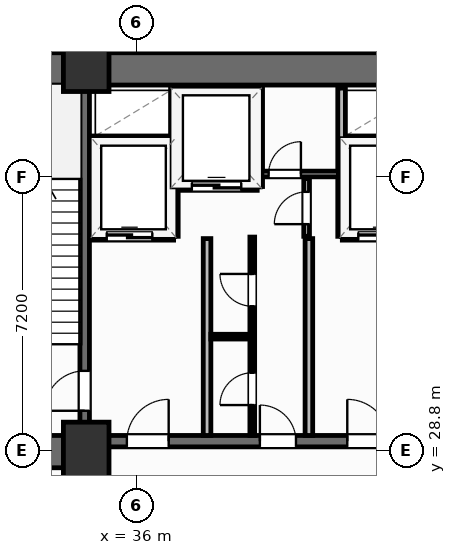
"""IFC4 building model, lengths in metres.
Left out: names, types, materials, properties, quantities, classifications, styles, units other than length and angle.
Written with IfcOpenShell. Run it as: python <this file> out.ifc"""

import sys

from ifc_helpers import new_model, si_unit, direction, frame, frame_2d, origin, origin_2d, place, context, subcontext, project, spatial, rectangle, extrude, element, fill, save


model = new_model("IFC4")
c1 = context("Model", 3, precision=1e-05, world=origin(), true_north=direction((0.0, 1.0)))
c2 = subcontext(c1, "Body", "Model", "MODEL_VIEW")
j1 = project(units=[si_unit("LENGTHUNIT", "METRE"), si_unit("PLANEANGLEUNIT", "RADIAN")], contexts=[c1])
p1 = place(None, origin())
s1 = spatial("IfcSite", under=j1, at=p1, CompositionType="ELEMENT")
p2 = place(p1, origin())
s2 = spatial("IfcBuilding", under=s1, at=p2, CompositionType="ELEMENT")
p3 = place(p2, frame((0.0, 0.0, 21.6)))
s3 = spatial("IfcBuildingStorey", under=s2, at=p3, CompositionType="ELEMENT", Elevation=21.6)
for number, where, z_axis, x_axis in (
    (1, (34.68, 28.75, 0.0), (0.0, 0.0, 1.0), (1.0, 0.0, 0.0)),
    (2, (34.68, 39.05, 0.0), (0.0, 0.0, 1.0), (1.0, 0.0, 0.0)),
):
    element("IfcColumn", number, at=place(p3, frame(where, z_axis=z_axis, x_axis=x_axis)), inside=s3, PredefinedType="COLUMN", context=c2, shape_type="SweptSolid", body=[
        extrude(rectangle(XDim=1.2, YDim=1.6, at=origin_2d()), origin(), (0.0, 0.0, 1.0), 5.4),
    ])
p4 = place(p3, frame((30.28, 38.845, 0.0), z_axis=(0.0, 0.0, 1.0), x_axis=(1.0, 0.0, 0.0)))
e3 = element("IfcWall", 3, at=p4, inside=s3, PredefinedType="SHEAR", context=c2, shape_type="SweptSolid", body=[
    extrude(rectangle(XDim=17.84, YDim=0.85, at=frame_2d((8.92, 0.0))), origin(), (0.0, 0.0, 1.0), 5.15),
])
p5 = place(p3, frame((30.28, 28.775, 0.0), z_axis=(0.0, 0.0, 1.0), x_axis=(1.0, 0.0, 0.0)))
e4 = element("IfcWall", 4, at=p5, inside=s3, PredefinedType="SHEAR", context=c2, shape_type="SweptSolid", body=[
    extrude(rectangle(XDim=4.52, YDim=0.85, at=frame_2d((2.26, 0.0))), origin(), (0.0, 0.0, 1.0), 5.15),
])
p6 = place(p3, frame((34.8, 29.05, 0.0), z_axis=(0.0, 0.0, 1.0), x_axis=(1.0, 0.0, 0.0)))
e5 = element("IfcWall", 5, at=p6, inside=s3, PredefinedType="SHEAR", context=c2, shape_type="SweptSolid", body=[
    extrude(rectangle(XDim=8.8, YDim=0.3, at=frame_2d((4.4, 0.0))), origin(), (0.0, 0.0, 1.0), 5.15),
])
p7 = place(p6, frame((0.95, 0.0, 0.0)))
e6 = element("IfcOpeningElement", 6, at=p7, cuts=e5, PredefinedType="OPENING", context=c2, shape_type="SweptSolid", body=[
    extrude(rectangle(XDim=1.1, YDim=2.15, at=frame_2d((0.55, 1.075))), frame((0.0, 0.16, 0.0), z_axis=(0.0, -1.0, 0.0), x_axis=(1.0, 0.0, 0.0)), (0.0, 0.0, 1.0), 0.32),
])
p8 = place(p6, frame((6.75, 0.0, 0.0)))
e7 = element("IfcOpeningElement", 7, at=p8, cuts=e5, PredefinedType="OPENING", context=c2, shape_type="SweptSolid", body=[
    extrude(rectangle(XDim=1.1, YDim=2.15, at=frame_2d((0.55, 1.075))), frame((0.0, 0.16, 0.0), z_axis=(0.0, -1.0, 0.0), x_axis=(1.0, 0.0, 0.0)), (0.0, 0.0, 1.0), 0.32),
])
p9 = place(p6, frame((4.45, 0.0, 0.0)))
e8 = element("IfcOpeningElement", 8, at=p9, cuts=e5, PredefinedType="OPENING", context=c2, shape_type="SweptSolid", body=[
    extrude(rectangle(XDim=0.95, YDim=2.15, at=frame_2d((0.475, 1.075))), frame((0.0, 0.16, 0.0), z_axis=(0.0, -1.0, 0.0), x_axis=(1.0, 0.0, 0.0)), (0.0, 0.0, 1.0), 0.32),
])
p10 = place(p3, frame((34.64, 29.2, 0.0), z_axis=(0.0, 0.0, 1.0), x_axis=(0.0, 1.0, 0.0)))
e9 = element("IfcWall", 9, at=p10, inside=s3, PredefinedType="SHEAR", context=c2, shape_type="SweptSolid", body=[
    extrude(rectangle(XDim=9.22, YDim=0.25, at=frame_2d((4.61, 0.0))), origin(), (0.0, 0.0, 1.0), 5.15),
])
p11 = place(p10, frame((0.65, 0.0, 0.0)))
e10 = element("IfcOpeningElement", 10, at=p11, cuts=e9, PredefinedType="OPENING", context=c2, shape_type="SweptSolid", body=[
    extrude(rectangle(XDim=1.05, YDim=2.15, at=frame_2d((0.525, 1.075))), frame((0.0, 0.135, 0.0), z_axis=(0.0, -1.0, 0.0), x_axis=(1.0, 0.0, 0.0)), (0.0, 0.0, 1.0), 0.27),
])
for number, where, z_axis, x_axis in (
    (11, (37.86, 29.2, 0.0), (0.0, 0.0, 1.0), (0.0, 1.0, 0.0)),
    (12, (40.54, 29.2, 0.0), (0.0, 0.0, 1.0), (0.0, 1.0, 0.0)),
):
    element("IfcWall", number, at=place(p3, frame(where, z_axis=z_axis, x_axis=x_axis)), inside=s3, PredefinedType="PARTITIONING", context=c2, shape_type="SweptSolid", body=[
        extrude(rectangle(XDim=5.18, YDim=0.2, at=frame_2d((2.59, 0.0))), origin(), (0.0, 0.0, 1.0), 5.15),
    ])
p12 = place(p3, frame((34.8, 34.44, 0.0), z_axis=(0.0, 0.0, 1.0), x_axis=(1.0, 0.0, 0.0)))
e13 = element("IfcWall", 13, at=p12, inside=s3, PredefinedType="PARTITIONING", context=c2, shape_type="SweptSolid", body=[
    extrude(rectangle(XDim=2.18, YDim=0.2, at=frame_2d((1.09, 0.0))), origin(), (0.0, 0.0, 1.0), 5.15),
])
p13 = place(p12, frame((0.42, 0.0, 0.0)))
e14 = element("IfcOpeningElement", 14, at=p13, cuts=e13, PredefinedType="OPENING", context=c2, shape_type="SweptSolid", body=[
    extrude(rectangle(XDim=1.2, YDim=2.2, at=frame_2d((0.6, 1.1))), frame((0.0, 0.11, 0.0), z_axis=(0.0, -1.0, 0.0), x_axis=(1.0, 0.0, 0.0)), (0.0, 0.0, 1.0), 0.22),
])
p14 = place(p3, frame((34.8, 36.98, 0.0), z_axis=(0.0, 0.0, 1.0), x_axis=(1.0, 0.0, 0.0)))
e15 = element("IfcWall", 15, at=p14, inside=s3, PredefinedType="PARTITIONING", context=c2, shape_type="SweptSolid", body=[
    extrude(rectangle(XDim=2.18, YDim=0.2, at=frame_2d((1.09, 0.0))), origin(), (0.0, 0.0, 1.0), 5.15),
])
p15 = place(p3, frame((37.0, 34.44, 0.0), z_axis=(0.0, 0.0, 1.0), x_axis=(0.0, 1.0, 0.0)))
e16 = element("IfcWall", 16, at=p15, inside=s3, PredefinedType="PARTITIONING", context=c2, shape_type="SweptSolid", body=[
    extrude(rectangle(XDim=3.9, YDim=0.2, at=frame_2d((1.95, 0.0))), origin(), (0.0, 0.0, 1.0), 5.15),
])
p16 = place(p3, frame((41.42, 34.44, 0.0), z_axis=(0.0, 0.0, 1.0), x_axis=(1.0, 0.0, 0.0)))
e17 = element("IfcWall", 17, at=p16, inside=s3, PredefinedType="PARTITIONING", context=c2, shape_type="SweptSolid", body=[
    extrude(rectangle(XDim=2.18, YDim=0.2, at=frame_2d((1.09, 0.0))), origin(), (0.0, 0.0, 1.0), 5.15),
])
p17 = place(p16, frame((0.42, 0.0, 0.0)))
e18 = element("IfcOpeningElement", 18, at=p17, cuts=e17, PredefinedType="OPENING", context=c2, shape_type="SweptSolid", body=[
    extrude(rectangle(XDim=1.2, YDim=2.2, at=frame_2d((0.6, 1.1))), frame((0.0, 0.11, 0.0), z_axis=(0.0, -1.0, 0.0), x_axis=(1.0, 0.0, 0.0)), (0.0, 0.0, 1.0), 0.22),
])
p18 = place(p3, frame((41.42, 36.98, 0.0), z_axis=(0.0, 0.0, 1.0), x_axis=(1.0, 0.0, 0.0)))
e19 = element("IfcWall", 19, at=p18, inside=s3, PredefinedType="PARTITIONING", context=c2, shape_type="SweptSolid", body=[
    extrude(rectangle(XDim=2.18, YDim=0.2, at=frame_2d((1.09, 0.0))), origin(), (0.0, 0.0, 1.0), 5.15),
])
p19 = place(p3, frame((41.4, 34.44, 0.0), z_axis=(0.0, 0.0, 1.0), x_axis=(0.0, 1.0, 0.0)))
e20 = element("IfcWall", 20, at=p19, inside=s3, PredefinedType="PARTITIONING", context=c2, shape_type="SweptSolid", body=[
    extrude(rectangle(XDim=3.9, YDim=0.2, at=frame_2d((1.95, 0.0))), origin(), (0.0, 0.0, 1.0), 5.15),
])
p20 = place(p3, frame((37.06, 35.75, 0.0), z_axis=(0.0, 0.0, 1.0), x_axis=(1.0, 0.0, 0.0)))
e21 = element("IfcWall", 21, at=p20, inside=s3, PredefinedType="PARTITIONING", context=c2, shape_type="SweptSolid", body=[
    extrude(rectangle(XDim=2.12, YDim=0.2, at=frame_2d((1.06, 0.0))), origin(), (0.0, 0.0, 1.0), 5.15),
])
p21 = place(p20, frame((0.4, 0.0, 0.0)))
e22 = element("IfcOpeningElement", 22, at=p21, cuts=e21, PredefinedType="OPENING", context=c2, shape_type="SweptSolid", body=[
    extrude(rectangle(XDim=1.3, YDim=2.2, at=frame_2d((0.65, 1.1))), frame((0.0, 0.11, 0.0), z_axis=(0.0, -1.0, 0.0), x_axis=(1.0, 0.0, 0.0)), (0.0, 0.0, 1.0), 0.22),
])
p22 = place(p3, frame((39.22, 35.75, 0.0), z_axis=(0.0, 0.0, 1.0), x_axis=(0.0, 1.0, 0.0)))
e23 = element("IfcWall", 23, at=p22, inside=s3, PredefinedType="PARTITIONING", context=c2, shape_type="SweptSolid", body=[
    extrude(rectangle(XDim=2.59, YDim=0.2, at=frame_2d((1.295, 0.0))), origin(), (0.0, 0.0, 1.0), 5.15),
])
p23 = place(p3, frame((39.3, 36.08, 0.0), z_axis=(0.0, 0.0, 1.0), x_axis=(1.0, 0.0, 0.0)))
e24 = element("IfcWall", 24, at=p23, inside=s3, PredefinedType="PARTITIONING", context=c2, shape_type="SweptSolid", body=[
    extrude(rectangle(XDim=2.02, YDim=0.15, at=frame_2d((1.01, 0.0))), origin(), (0.0, 0.0, 1.0), 5.15),
])
p24 = place(p23, frame((0.18, 0.0, 0.0)))
e25 = element("IfcOpeningElement", 25, at=p24, cuts=e24, PredefinedType="OPENING", context=c2, shape_type="SweptSolid", body=[
    extrude(rectangle(XDim=0.85, YDim=2.05, at=frame_2d((0.425, 1.025))), frame((0.0, 0.085, 0.0), z_axis=(0.0, -1.0, 0.0), x_axis=(1.0, 0.0, 0.0)), (0.0, 0.0, 1.0), 0.17),
])
p25 = place(p3, frame((40.48, 34.44, 0.0), z_axis=(0.0, 0.0, 1.0), x_axis=(0.0, 1.0, 0.0)))
e26 = element("IfcWall", 26, at=p25, inside=s3, PredefinedType="PARTITIONING", context=c2, shape_type="SweptSolid", body=[
    extrude(rectangle(XDim=1.52, YDim=0.15, at=frame_2d((0.76, 0.0))), origin(), (0.0, 0.0, 1.0), 5.15),
])
p26 = place(p25, frame((0.32, 0.0, 0.0)))
e27 = element("IfcOpeningElement", 27, at=p26, cuts=e26, PredefinedType="OPENING", context=c2, shape_type="SweptSolid", body=[
    extrude(rectangle(XDim=0.85, YDim=2.05, at=frame_2d((0.425, 1.025))), frame((0.0, 0.085, 0.0), z_axis=(0.0, -1.0, 0.0), x_axis=(1.0, 0.0, 0.0)), (0.0, 0.0, 1.0), 0.17),
])
p27 = place(p3, frame((37.96, 31.8, 0.0), z_axis=(0.0, 0.0, 1.0), x_axis=(1.0, 0.0, 0.0)))
e28 = element("IfcWall", 28, at=p27, inside=s3, PredefinedType="PARTITIONING", context=c2, shape_type="SweptSolid", body=[
    extrude(rectangle(XDim=1.09, YDim=0.125, at=frame_2d((0.545, 0.0))), origin(), (0.0, 0.0, 1.0), 5.15),
])
p28 = place(p3, frame((39.05, 29.2, 0.0), z_axis=(0.0, 0.0, 1.0), x_axis=(0.0, 1.0, 0.0)))
e29 = element("IfcWall", 29, at=p28, inside=s3, PredefinedType="PARTITIONING", context=c2, shape_type="SweptSolid", body=[
    extrude(rectangle(XDim=5.22, YDim=0.125, at=frame_2d((2.61, 0.0))), origin(), (0.0, 0.0, 1.0), 5.15),
])
p29 = place(p28, frame((0.8, 0.0, 0.0)))
e30 = element("IfcOpeningElement", 30, at=p29, cuts=e29, PredefinedType="OPENING", context=c2, shape_type="SweptSolid", body=[
    extrude(rectangle(XDim=0.85, YDim=2.05, at=frame_2d((0.425, 1.025))), frame((0.0, 0.073, 0.0), z_axis=(0.0, -1.0, 0.0), x_axis=(1.0, 0.0, 0.0)), (0.0, 0.0, 1.0), 0.145),
])
p30 = place(p28, frame((3.4, 0.0, 0.0)))
e31 = element("IfcOpeningElement", 31, at=p30, cuts=e29, PredefinedType="OPENING", context=c2, shape_type="SweptSolid", body=[
    extrude(rectangle(XDim=0.85, YDim=2.05, at=frame_2d((0.425, 1.025))), frame((0.0, 0.073, 0.0), z_axis=(0.0, -1.0, 0.0), x_axis=(1.0, 0.0, 0.0)), (0.0, 0.0, 1.0), 0.145),
])
p31 = place(p11, origin())
e32 = element("IfcDoor", 32, at=p31, inside=s3, OperationType="SINGLE_SWING_LEFT", PredefinedType="DOOR", context=c2, shape_type="SweptSolid", body=[
    extrude(rectangle(XDim=1.05, YDim=2.15, at=frame_2d((0.525, 1.075))), frame((0.0, 0.025, 0.0), z_axis=(0.0, -1.0, 0.0), x_axis=(1.0, 0.0, 0.0)), (0.0, 0.0, 1.0), 0.05),
])
fill(e10, e32)
p32 = place(p7, origin())
e33 = element("IfcDoor", 33, at=p32, inside=s3, OperationType="SINGLE_SWING_RIGHT", PredefinedType="DOOR", context=c2, shape_type="SweptSolid", body=[
    extrude(rectangle(XDim=1.1, YDim=2.15, at=frame_2d((0.55, 1.075))), frame((0.0, 0.025, 0.0), z_axis=(0.0, -1.0, 0.0), x_axis=(1.0, 0.0, 0.0)), (0.0, 0.0, 1.0), 0.05),
])
fill(e6, e33)
p33 = place(p8, origin())
e34 = element("IfcDoor", 34, at=p33, inside=s3, OperationType="SINGLE_SWING_LEFT", PredefinedType="DOOR", context=c2, shape_type="SweptSolid", body=[
    extrude(rectangle(XDim=1.1, YDim=2.15, at=frame_2d((0.55, 1.075))), frame((0.0, 0.025, 0.0), z_axis=(0.0, -1.0, 0.0), x_axis=(1.0, 0.0, 0.0)), (0.0, 0.0, 1.0), 0.05),
])
fill(e7, e34)
p34 = place(p13, origin())
e35 = element("IfcDoor", 35, at=p34, inside=s3, OperationType="SLIDING_TO_LEFT", PredefinedType="DOOR", context=c2, shape_type="SweptSolid", body=[
    extrude(rectangle(XDim=1.2, YDim=2.2, at=frame_2d((0.6, 1.1))), frame((0.0, 0.025, 0.0), z_axis=(0.0, -1.0, 0.0), x_axis=(1.0, 0.0, 0.0)), (0.0, 0.0, 1.0), 0.05),
])
fill(e14, e35)
p35 = place(p17, origin())
e36 = element("IfcDoor", 36, at=p35, inside=s3, OperationType="SLIDING_TO_LEFT", PredefinedType="DOOR", context=c2, shape_type="SweptSolid", body=[
    extrude(rectangle(XDim=1.2, YDim=2.2, at=frame_2d((0.6, 1.1))), frame((0.0, 0.025, 0.0), z_axis=(0.0, -1.0, 0.0), x_axis=(1.0, 0.0, 0.0)), (0.0, 0.0, 1.0), 0.05),
])
fill(e18, e36)
p36 = place(p21, origin())
e37 = element("IfcDoor", 37, at=p36, inside=s3, OperationType="SLIDING_TO_LEFT", PredefinedType="DOOR", context=c2, shape_type="SweptSolid", body=[
    extrude(rectangle(XDim=1.3, YDim=2.2, at=frame_2d((0.65, 1.1))), frame((0.0, 0.025, 0.0), z_axis=(0.0, -1.0, 0.0), x_axis=(1.0, 0.0, 0.0)), (0.0, 0.0, 1.0), 0.05),
])
fill(e22, e37)
p37 = place(p24, origin())
e38 = element("IfcDoor", 38, at=p37, inside=s3, OperationType="SINGLE_SWING_RIGHT", PredefinedType="DOOR", context=c2, shape_type="SweptSolid", body=[
    extrude(rectangle(XDim=0.85, YDim=2.05, at=frame_2d((0.425, 1.025))), frame((0.0, 0.025, 0.0), z_axis=(0.0, -1.0, 0.0), x_axis=(1.0, 0.0, 0.0)), (0.0, 0.0, 1.0), 0.05),
])
fill(e25, e38)
p38 = place(p26, origin())
e39 = element("IfcDoor", 39, at=p38, inside=s3, OperationType="SINGLE_SWING_LEFT", PredefinedType="DOOR", context=c2, shape_type="SweptSolid", body=[
    extrude(rectangle(XDim=0.85, YDim=2.05, at=frame_2d((0.425, 1.025))), frame((0.0, 0.025, 0.0), z_axis=(0.0, -1.0, 0.0), x_axis=(1.0, 0.0, 0.0)), (0.0, 0.0, 1.0), 0.05),
])
fill(e27, e39)
p39 = place(p29, origin())
e40 = element("IfcDoor", 40, at=p39, inside=s3, OperationType="SINGLE_SWING_LEFT", PredefinedType="DOOR", context=c2, shape_type="SweptSolid", body=[
    extrude(rectangle(XDim=0.85, YDim=2.05, at=frame_2d((0.425, 1.025))), frame((0.0, 0.025, 0.0), z_axis=(0.0, -1.0, 0.0), x_axis=(1.0, 0.0, 0.0)), (0.0, 0.0, 1.0), 0.05),
])
fill(e30, e40)
p40 = place(p30, origin())
e41 = element("IfcDoor", 41, at=p40, inside=s3, OperationType="SINGLE_SWING_RIGHT", PredefinedType="DOOR", context=c2, shape_type="SweptSolid", body=[
    extrude(rectangle(XDim=0.85, YDim=2.05, at=frame_2d((0.425, 1.025))), frame((0.0, 0.025, 0.0), z_axis=(0.0, -1.0, 0.0), x_axis=(1.0, 0.0, 0.0)), (0.0, 0.0, 1.0), 0.05),
])
fill(e31, e41)
p41 = place(p9, origin())
e42 = element("IfcDoor", 42, at=p41, inside=s3, OperationType="SINGLE_SWING_LEFT", PredefinedType="DOOR", context=c2, shape_type="SweptSolid", body=[
    extrude(rectangle(XDim=0.95, YDim=2.15, at=frame_2d((0.475, 1.075))), frame((0.0, 0.025, 0.0), z_axis=(0.0, -1.0, 0.0), x_axis=(1.0, 0.0, 0.0)), (0.0, 0.0, 1.0), 0.05),
])
fill(e8, e42)
save(model, sys.argv[1])
